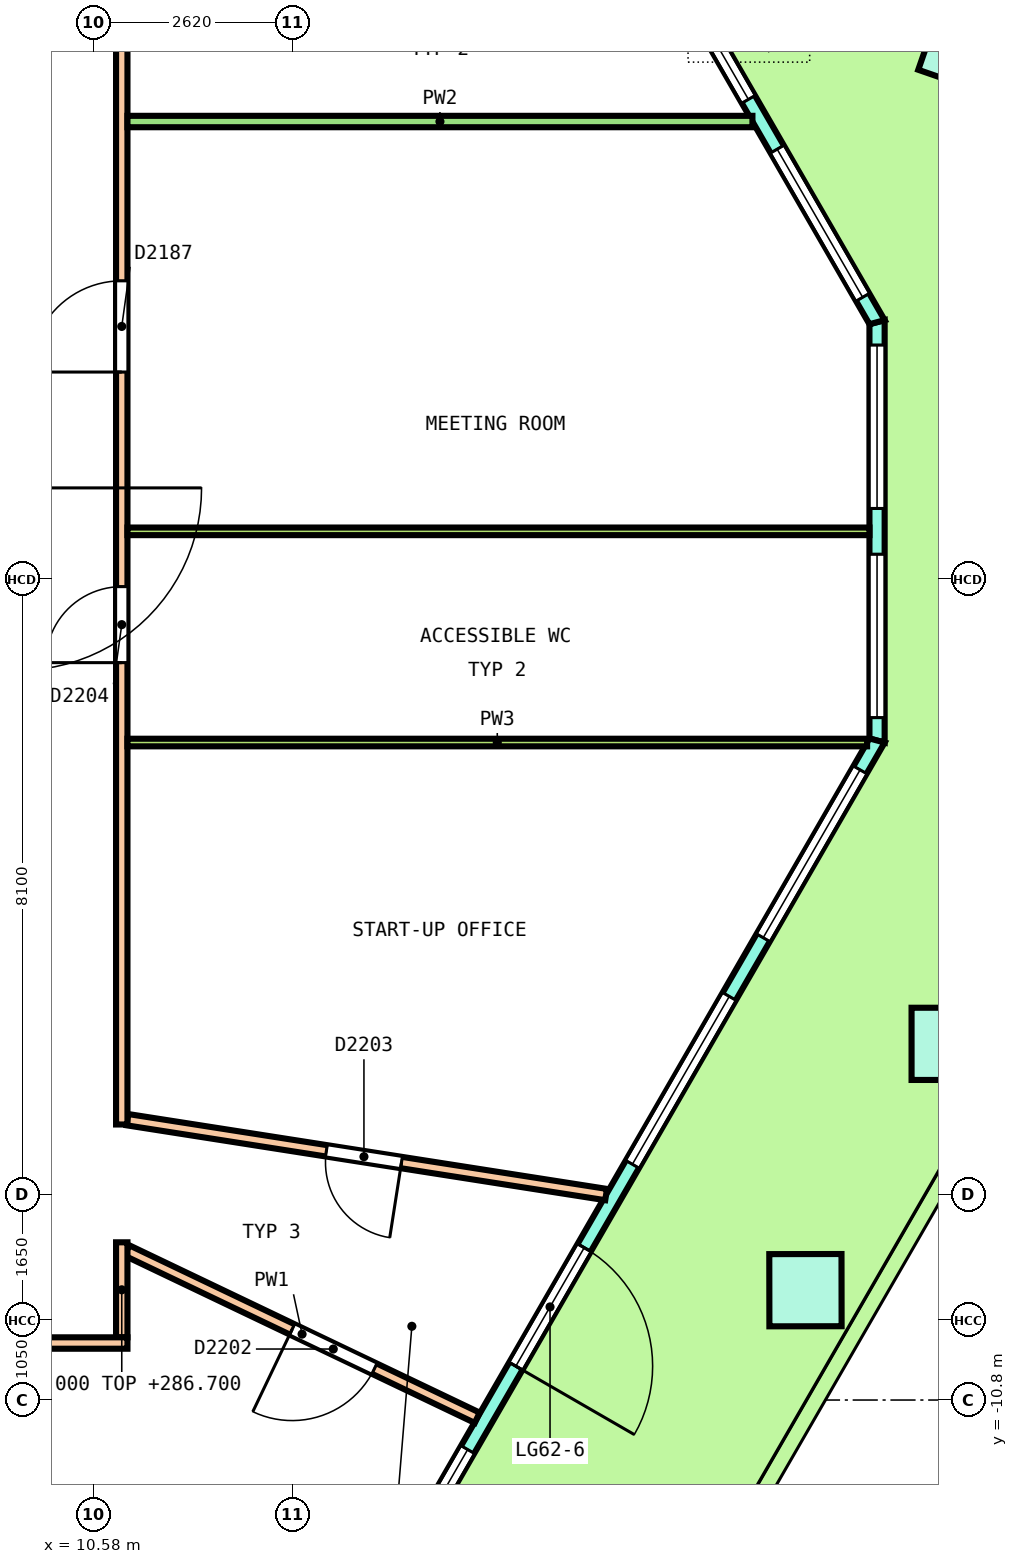
"""IFC4 building model, lengths in metres.
Left out: names, types, materials, properties, quantities, classifications, styles, units other than length and angle.
Written with IfcOpenShell. Run it as: python <this file> out.ifc"""

import sys

from ifc_helpers import new_model, si_unit, direction, frame, frame_2d, origin, origin_2d, place, context, subcontext, project, spatial, polyline, rectangle, outline, extrude, element, fill, save


model = new_model("IFC4")
c1 = context("Model", 3, precision=1e-05, world=origin(), true_north=direction((0.0, 1.0)))
c2 = subcontext(c1, "Body", "Model", "MODEL_VIEW")
j1 = project(units=[si_unit("LENGTHUNIT", "METRE"), si_unit("PLANEANGLEUNIT", "RADIAN")], contexts=[c1])
p1 = place(None, origin())
s1 = spatial("IfcSite", under=j1, at=p1, CompositionType="ELEMENT")
p2 = place(p1, origin())
s2 = spatial("IfcBuilding", under=s1, at=p2, CompositionType="ELEMENT")
p3 = place(p2, frame((0.0, 0.0, 283.0)))
s3 = spatial("IfcBuildingStorey", under=s2, at=p3, CompositionType="ELEMENT", Elevation=283.0)
p4 = place(p3, frame((22.033, 6.994, 0.0), z_axis=(0.021727128018, 0.025136615799, 0.999447888814), x_axis=(-0.500981292203, 0.865389796007, -0.010874089855)))
e1 = element("IfcColumn", 1, at=p4, inside=s3, PredefinedType="COLUMN", context=c2, shape_type="SweptSolid", body=[
    extrude(rectangle(XDim=0.95, YDim=0.95, at=origin_2d()), origin(), (0.0, 0.0, 1.0), 3.652),
])
p5 = place(p3, frame((19.945, -9.355, 0.0), z_axis=(0.003678832152, 0.006287458586, 0.999973466677), x_axis=(0.503695370374, 0.863850628317, -0.007284629059)))
e2 = element("IfcColumn", 2, at=p5, inside=s3, PredefinedType="COLUMN", context=c2, shape_type="SweptSolid", body=[
    extrude(rectangle(XDim=0.95, YDim=0.95, at=origin_2d()), origin(), (0.0, 0.0, 1.0), 3.65),
])
p6 = place(p3, frame((21.816, -6.114, 0.0), z_axis=(0.010900423214, 0.018858400897, 0.999762742599), x_axis=(0.500226175498, 0.86562076849, -0.02178206845)))
e3 = element("IfcColumn", 3, at=p6, inside=s3, PredefinedType="COLUMN", context=c2, shape_type="SweptSolid", body=[
    extrude(rectangle(XDim=0.95, YDim=0.95, at=origin_2d()), origin(), (0.0, 0.0, 1.0), 3.651),
])
p7 = place(p3, frame((20.887, -2.123, 0.0), z_axis=(0.0, 0.0, 1.0), x_axis=(0.0, 1.0, 0.0)))
e4 = element("IfcWall", 4, at=p7, inside=s3, PredefinedType="SOLIDWALL", context=c2, shape_type="SweptSolid", body=[
    extrude(outline(polyline([(-0.027, -0.1), (1.084, -0.1), (2.196, -0.1), (3.307, -0.1), (4.419, -0.1), (5.53, -0.1), (5.477, 0.1), (4.387, 0.1), (3.297, 0.1), (2.207, 0.1), (1.117, 0.1), (0.027, 0.1), (-0.027, -0.1)])), origin(), (0.0, 0.0, 1.0), 3.7),
])
p8 = place(p7, frame((0.301, 0.0, 0.1)))
e5 = element("IfcOpeningElement", 5, at=p8, cuts=e4, PredefinedType="OPENING", context=c2, shape_type="SweptSolid", body=[
    extrude(rectangle(XDim=2.15, YDim=2.75, at=frame_2d((1.075, 1.375))), frame((0.0, 0.11, 0.0), z_axis=(0.0, -1.0, 0.0), x_axis=(1.0, 0.0, 0.0)), (0.0, 0.0, 1.0), 0.22),
])
p9 = place(p7, frame((3.052, 0.0, 0.1)))
e6 = element("IfcOpeningElement", 6, at=p9, cuts=e4, PredefinedType="OPENING", context=c2, shape_type="SweptSolid", body=[
    extrude(rectangle(XDim=2.15, YDim=2.75, at=frame_2d((1.075, 1.375))), frame((0.0, 0.11, 0.0), z_axis=(0.0, -1.0, 0.0), x_axis=(1.0, 0.0, 0.0)), (0.0, 0.0, 1.0), 0.22),
])
p10 = place(p3, frame((20.887, 3.38, 0.0), z_axis=(0.0, 0.0, 1.0), x_axis=(-0.50000644309, 0.866021683832, 0.0)))
e7 = element("IfcWall", 7, at=p10, inside=s3, PredefinedType="SOLIDWALL", context=c2, shape_type="SweptSolid", body=[
    extrude(outline(polyline([(-0.027, -0.1), (0.979, -0.1), (1.985, -0.1), (2.99, -0.1), (3.996, -0.1), (5.002, -0.1), (6.007, -0.1), (7.013, -0.1), (8.019, -0.1), (9.025, -0.1), (10.03, -0.1), (11.036, -0.1), (12.042, -0.1), (13.047, -0.1), (14.053, -0.1), (15.059, -0.1), (15.005, 0.1), (14.007, 0.1), (13.008, 0.1), (12.01, 0.1), (11.011, 0.1), (10.012, 0.1), (9.014, 0.1), (8.015, 0.1), (7.017, 0.1), (6.018, 0.1), (5.02, 0.1), (4.021, 0.1), (3.022, 0.1), (2.024, 0.1), (1.025, 0.1), (0.027, 0.1), (-0.027, -0.1)])), origin(), (0.0, 0.0, 1.0), 3.7),
])
p11 = place(p10, frame((0.378, 0.0, 0.1)))
e8 = element("IfcOpeningElement", 8, at=p11, cuts=e7, PredefinedType="OPENING", context=c2, shape_type="SweptSolid", body=[
    extrude(rectangle(XDim=2.25, YDim=2.75, at=frame_2d((1.125, 1.375))), frame((0.0, 0.11, 0.0), z_axis=(0.0, -1.0, 0.0), x_axis=(1.0, 0.0, 0.0)), (0.0, 0.0, 1.0), 0.22),
])
p12 = place(p10, frame((3.385, 0.0, 0.1)))
e9 = element("IfcOpeningElement", 9, at=p12, cuts=e7, PredefinedType="OPENING", context=c2, shape_type="SweptSolid", body=[
    extrude(rectangle(XDim=2.25, YDim=2.75, at=frame_2d((1.125, 1.375))), frame((0.0, 0.11, 0.0), z_axis=(0.0, -1.0, 0.0), x_axis=(1.0, 0.0, 0.0)), (0.0, 0.0, 1.0), 0.22),
])
p13 = place(p10, frame((6.616, 0.0, 0.0)))
e10 = element("IfcOpeningElement", 10, at=p13, cuts=e7, PredefinedType="OPENING", context=c2, shape_type="SweptSolid", body=[
    extrude(rectangle(XDim=1.8, YDim=2.4, at=frame_2d((0.9, 1.2))), frame((0.0, 0.11, 0.0), z_axis=(0.0, -1.0, 0.0), x_axis=(1.0, 0.0, 0.0)), (0.0, 0.0, 1.0), 0.22),
])
p14 = place(p10, frame((6.616, 0.0, 2.55)))
e11 = element("IfcOpeningElement", 11, at=p14, cuts=e7, PredefinedType="OPENING", context=c2, shape_type="SweptSolid", body=[
    extrude(rectangle(XDim=1.8, YDim=0.3, at=frame_2d((0.9, 0.15))), frame((0.0, 0.11, 0.0), z_axis=(0.0, -1.0, 0.0), x_axis=(1.0, 0.0, 0.0)), (0.0, 0.0, 1.0), 0.22),
])
p15 = place(p10, frame((9.397, 0.0, 0.1)))
e12 = element("IfcOpeningElement", 12, at=p15, cuts=e7, PredefinedType="OPENING", context=c2, shape_type="SweptSolid", body=[
    extrude(rectangle(XDim=2.25, YDim=2.75, at=frame_2d((1.125, 1.375))), frame((0.0, 0.11, 0.0), z_axis=(0.0, -1.0, 0.0), x_axis=(1.0, 0.0, 0.0)), (0.0, 0.0, 1.0), 0.22),
])
p16 = place(p10, frame((12.404, 0.0, 0.1)))
e13 = element("IfcOpeningElement", 13, at=p16, cuts=e7, PredefinedType="OPENING", context=c2, shape_type="SweptSolid", body=[
    extrude(rectangle(XDim=2.25, YDim=2.75, at=frame_2d((1.125, 1.375))), frame((0.0, 0.11, 0.0), z_axis=(0.0, -1.0, 0.0), x_axis=(1.0, 0.0, 0.0)), (0.0, 0.0, 1.0), 0.22),
])
p17 = place(p3, frame((12.282, -17.027, 0.0), z_axis=(0.0, 0.0, 1.0), x_axis=(0.500006945931, 0.866021393512, 0.0)))
e14 = element("IfcWall", 14, at=p17, inside=s3, PredefinedType="SOLIDWALL", context=c2, shape_type="SweptSolid", body=[
    extrude(outline(polyline([(-0.027, -0.1), (0.989, -0.1), (2.004, -0.1), (3.02, -0.1), (4.035, -0.1), (5.051, -0.1), (6.066, -0.1), (7.081, -0.1), (8.097, -0.1), (9.112, -0.1), (10.128, -0.1), (11.143, -0.1), (12.159, -0.1), (13.174, -0.1), (14.19, -0.1), (15.205, -0.1), (16.221, -0.1), (17.236, -0.1), (17.182, 0.1), (16.173, 0.1), (15.164, 0.1), (14.155, 0.1), (13.146, 0.1), (12.137, 0.1), (11.127, 0.1), (10.118, 0.1), (9.109, 0.1), (8.1, 0.1), (7.091, 0.1), (6.082, 0.1), (5.073, 0.1), (4.063, 0.1), (3.054, 0.1), (2.045, 0.1), (1.036, 0.1), (0.027, 0.1), (-0.027, -0.1)])), origin(), (0.0, 0.0, 1.0), 3.7),
])
p18 = place(p17, frame((0.446, 0.0, 0.1)))
e15 = element("IfcOpeningElement", 15, at=p18, cuts=e14, PredefinedType="OPENING", context=c2, shape_type="SweptSolid", body=[
    extrude(rectangle(XDim=2.55, YDim=2.75, at=frame_2d((1.275, 1.375))), frame((0.0, 0.11, 0.0), z_axis=(0.0, -1.0, 0.0), x_axis=(1.0, 0.0, 0.0)), (0.0, 0.0, 1.0), 0.22),
])
p19 = place(p17, frame((3.888, 0.0, 0.1)))
e16 = element("IfcOpeningElement", 16, at=p19, cuts=e14, PredefinedType="OPENING", context=c2, shape_type="SweptSolid", body=[
    extrude(rectangle(XDim=2.55, YDim=2.75, at=frame_2d((1.275, 1.375))), frame((0.0, 0.11, 0.0), z_axis=(0.0, -1.0, 0.0), x_axis=(1.0, 0.0, 0.0)), (0.0, 0.0, 1.0), 0.22),
])
p20 = place(p17, frame((7.705, 0.0, 0.0)))
e17 = element("IfcOpeningElement", 17, at=p20, cuts=e14, PredefinedType="OPENING", context=c2, shape_type="SweptSolid", body=[
    extrude(rectangle(XDim=1.8, YDim=2.4, at=frame_2d((0.9, 1.2))), frame((0.0, 0.11, 0.0), z_axis=(0.0, -1.0, 0.0), x_axis=(1.0, 0.0, 0.0)), (0.0, 0.0, 1.0), 0.22),
])
p21 = place(p17, frame((7.705, 0.0, 2.55)))
e18 = element("IfcOpeningElement", 18, at=p21, cuts=e14, PredefinedType="OPENING", context=c2, shape_type="SweptSolid", body=[
    extrude(rectangle(XDim=1.8, YDim=0.3, at=frame_2d((0.9, 0.15))), frame((0.0, 0.11, 0.0), z_axis=(0.0, -1.0, 0.0), x_axis=(1.0, 0.0, 0.0)), (0.0, 0.0, 1.0), 0.22),
])
p22 = place(p17, frame((10.771, 0.0, 0.1)))
e19 = element("IfcOpeningElement", 19, at=p22, cuts=e14, PredefinedType="OPENING", context=c2, shape_type="SweptSolid", body=[
    extrude(rectangle(XDim=2.55, YDim=2.75, at=frame_2d((1.275, 1.375))), frame((0.0, 0.11, 0.0), z_axis=(0.0, -1.0, 0.0), x_axis=(1.0, 0.0, 0.0)), (0.0, 0.0, 1.0), 0.22),
])
p23 = place(p17, frame((14.213, 0.0, 0.1)))
e20 = element("IfcOpeningElement", 20, at=p23, cuts=e14, PredefinedType="OPENING", context=c2, shape_type="SweptSolid", body=[
    extrude(rectangle(XDim=2.55, YDim=2.75, at=frame_2d((1.275, 1.375))), frame((0.0, 0.11, 0.0), z_axis=(0.0, -1.0, 0.0), x_axis=(1.0, 0.0, 0.0)), (0.0, 0.0, 1.0), 0.22),
])
p24 = place(p3, frame((11.018, -8.832, 0.0), z_axis=(0.0, 0.0, 1.0), x_axis=(0.902358965465, -0.430985263605, 0.0)))
e21 = element("IfcWall", 21, at=p24, inside=s3, PredefinedType="PARTITIONING", context=c2, shape_type="SweptSolid", body=[
    extrude(rectangle(XDim=5.108, YDim=0.15, at=frame_2d((2.554, 0.0))), origin(), (0.0, 0.0, 1.0), 2.9),
])
p25 = place(p24, frame((2.409, 0.0, 0.0)))
e22 = element("IfcOpeningElement", 22, at=p25, cuts=e21, PredefinedType="OPENING", context=c2, shape_type="SweptSolid", body=[
    extrude(rectangle(XDim=1.2, YDim=2.1, at=frame_2d((0.6, 1.05))), frame((0.0, 0.085, 0.0), z_axis=(0.0, -1.0, 0.0), x_axis=(1.0, 0.0, 0.0)), (0.0, 0.0, 1.0), 0.17),
])
p26 = place(p3, frame((11.024, -7.112, 0.0), z_axis=(0.0, 0.0, 1.0), x_axis=(0.987981529177, -0.154571983245, 0.0)))
e23 = element("IfcWall", 23, at=p26, inside=s3, PredefinedType="PARTITIONING", context=c2, shape_type="SweptSolid", body=[
    extrude(rectangle(XDim=6.375, YDim=0.15, at=frame_2d((3.188, 0.0))), origin(), (0.0, 0.0, 1.0), 2.9),
])
p27 = place(p26, frame((2.65, 0.0, 0.0)))
e24 = element("IfcOpeningElement", 24, at=p27, cuts=e23, PredefinedType="OPENING", context=c2, shape_type="SweptSolid", body=[
    extrude(rectangle(XDim=1.0, YDim=2.1, at=frame_2d((0.5, 1.05))), frame((0.0, 0.085, 0.0), z_axis=(0.0, -1.0, 0.0), x_axis=(1.0, 0.0, 0.0)), (0.0, 0.0, 1.0), 0.17),
])
p28 = place(p3, frame((10.95, -9.975, 0.0), z_axis=(0.0, 0.0, 1.0), x_axis=(0.0, 1.0, 0.0)))
e25 = element("IfcWall", 25, at=p28, inside=s3, PredefinedType="PARTITIONING", context=c2, shape_type="SweptSolid", body=[
    extrude(rectangle(XDim=1.25, YDim=0.15, at=frame_2d((0.625, 0.0))), origin(), (0.0, 0.0, 1.0), 3.7),
])
p29 = place(p3, frame((10.95, -7.175, 0.0), z_axis=(0.0, 0.0, 1.0), x_axis=(0.0, 1.0, 0.0)))
e26 = element("IfcWall", 26, at=p29, inside=s3, PredefinedType="PARTITIONING", context=c2, shape_type="SweptSolid", body=[
    extrude(rectangle(XDim=17.15, YDim=0.15, at=frame_2d((8.575, 0.0))), origin(), (0.0, 0.0, 1.0), 2.9),
])
p30 = place(p29, frame((9.899, 0.0, 0.0)))
e27 = element("IfcOpeningElement", 27, at=p30, cuts=e26, PredefinedType="OPENING", context=c2, shape_type="SweptSolid", body=[
    extrude(rectangle(XDim=1.2, YDim=2.1, at=frame_2d((0.6, 1.05))), frame((0.0, 0.085, 0.0), z_axis=(0.0, -1.0, 0.0), x_axis=(1.0, 0.0, 0.0)), (0.0, 0.0, 1.0), 0.17),
])
p31 = place(p29, frame((14.71, 0.0, 0.0)))
e28 = element("IfcOpeningElement", 28, at=p31, cuts=e26, PredefinedType="OPENING", context=c2, shape_type="SweptSolid", body=[
    extrude(rectangle(XDim=1.0, YDim=2.1, at=frame_2d((0.5, 1.05))), frame((0.0, 0.085, 0.0), z_axis=(0.0, -1.0, 0.0), x_axis=(1.0, 0.0, 0.0)), (0.0, 0.0, 1.0), 0.17),
])
p32 = place(p29, frame((6.076, 0.0, 0.0)))
e29 = element("IfcOpeningElement", 29, at=p32, cuts=e26, PredefinedType="OPENING", context=c2, shape_type="SweptSolid", body=[
    extrude(rectangle(XDim=1.0, YDim=2.1, at=frame_2d((0.5, 1.05))), frame((0.0, 0.085, 0.0), z_axis=(0.0, -1.0, 0.0), x_axis=(1.0, 0.0, 0.0)), (0.0, 0.0, 1.0), 0.17),
])
p33 = place(p3, frame((-10.9, -10.05, 0.0), z_axis=(0.0, 0.0, 1.0), x_axis=(1.0, 0.0, 0.0)))
e30 = element("IfcWall", 30, at=p33, inside=s3, PredefinedType="PARTITIONING", context=c2, shape_type="SweptSolid", body=[
    extrude(rectangle(XDim=21.925, YDim=0.15, at=frame_2d((10.962, 0.0))), origin(), (0.0, 0.0, 1.0), 2.9),
])
p34 = place(p33, frame((2.562, 0.0, 0.0)))
e31 = element("IfcOpeningElement", 31, at=p34, cuts=e30, PredefinedType="OPENING", context=c2, shape_type="SweptSolid", body=[
    extrude(rectangle(XDim=1.2, YDim=2.1, at=frame_2d((0.6, 1.05))), frame((0.0, 0.085, 0.0), z_axis=(0.0, -1.0, 0.0), x_axis=(1.0, 0.0, 0.0)), (0.0, 0.0, 1.0), 0.17),
])
p35 = place(p33, frame((9.227, 0.0, 0.0)))
e32 = element("IfcOpeningElement", 32, at=p35, cuts=e30, PredefinedType="OPENING", context=c2, shape_type="SweptSolid", body=[
    extrude(rectangle(XDim=1.2, YDim=2.1, at=frame_2d((0.6, 1.05))), frame((0.0, 0.085, 0.0), z_axis=(0.0, -1.0, 0.0), x_axis=(1.0, 0.0, 0.0)), (0.0, 0.0, 1.0), 0.17),
])
p36 = place(p33, frame((16.632, 0.0, 0.0)))
e33 = element("IfcOpeningElement", 33, at=p36, cuts=e30, PredefinedType="OPENING", context=c2, shape_type="SweptSolid", body=[
    extrude(rectangle(XDim=1.0, YDim=2.1, at=frame_2d((0.5, 1.05))), frame((0.0, 0.085, 0.0), z_axis=(0.0, -1.0, 0.0), x_axis=(1.0, 0.0, 0.0)), (0.0, 0.0, 1.0), 0.17),
])
p37 = place(p3, frame((11.025, 6.02, 0.0), z_axis=(0.0, 0.0, 1.0), x_axis=(1.0, 0.0, 0.0)))
e34 = element("IfcWall", 34, at=p37, inside=s3, PredefinedType="PARTITIONING", context=c2, shape_type="SweptSolid", body=[
    extrude(rectangle(XDim=8.222, YDim=0.15, at=frame_2d((4.111, 0.0))), origin(), (0.0, 0.0, 1.0), 2.9),
])
p38 = place(p3, frame((11.025, 0.628, 0.0), z_axis=(0.0, 0.0, 1.0), x_axis=(1.0, 0.0, 0.0)))
e35 = element("IfcWall", 35, at=p38, inside=s3, PredefinedType="PARTITIONING", context=c2, shape_type="SweptSolid", body=[
    extrude(rectangle(XDim=9.762, YDim=0.1, at=frame_2d((4.881, 0.0))), origin(), (0.0, 0.0, 1.0), 2.9),
])
p39 = place(p3, frame((11.025, -2.15, 0.0), z_axis=(0.0, 0.0, 1.0), x_axis=(1.0, 0.0, 0.0)))
e36 = element("IfcWall", 36, at=p39, inside=s3, PredefinedType="PARTITIONING", context=c2, shape_type="SweptSolid", body=[
    extrude(rectangle(XDim=9.731, YDim=0.1, at=frame_2d((4.865, 0.0))), origin(), (0.0, 0.0, 1.0), 2.9),
])
p40 = place(p8, origin())
e37 = element("IfcWindow", 37, at=p40, inside=s3, PartitioningType="SINGLE_PANEL", PredefinedType="WINDOW", context=c2, shape_type="SweptSolid", body=[
    extrude(rectangle(XDim=2.15, YDim=2.75, at=frame_2d((1.075, 1.375))), frame((0.0, 0.03, 0.0), z_axis=(0.0, -1.0, 0.0), x_axis=(1.0, 0.0, 0.0)), (0.0, 0.0, 1.0), 0.06),
])
fill(e5, e37)
p41 = place(p9, origin())
e38 = element("IfcWindow", 38, at=p41, inside=s3, PartitioningType="SINGLE_PANEL", PredefinedType="WINDOW", context=c2, shape_type="SweptSolid", body=[
    extrude(rectangle(XDim=2.15, YDim=2.75, at=frame_2d((1.075, 1.375))), frame((0.0, 0.03, 0.0), z_axis=(0.0, -1.0, 0.0), x_axis=(1.0, 0.0, 0.0)), (0.0, 0.0, 1.0), 0.06),
])
fill(e6, e38)
p42 = place(p11, origin())
e39 = element("IfcWindow", 39, at=p42, inside=s3, PartitioningType="SINGLE_PANEL", PredefinedType="WINDOW", context=c2, shape_type="SweptSolid", body=[
    extrude(rectangle(XDim=2.25, YDim=2.75, at=frame_2d((1.125, 1.375))), frame((0.0, 0.03, 0.0), z_axis=(0.0, -1.0, 0.0), x_axis=(1.0, 0.0, 0.0)), (0.0, 0.0, 1.0), 0.06),
])
fill(e8, e39)
p43 = place(p12, origin())
e40 = element("IfcWindow", 40, at=p43, inside=s3, PartitioningType="SINGLE_PANEL", PredefinedType="WINDOW", context=c2, shape_type="SweptSolid", body=[
    extrude(rectangle(XDim=2.25, YDim=2.75, at=frame_2d((1.125, 1.375))), frame((0.0, 0.03, 0.0), z_axis=(0.0, -1.0, 0.0), x_axis=(1.0, 0.0, 0.0)), (0.0, 0.0, 1.0), 0.06),
])
fill(e9, e40)
p44 = place(p19, origin())
e41 = element("IfcWindow", 41, at=p44, inside=s3, PartitioningType="SINGLE_PANEL", PredefinedType="WINDOW", context=c2, shape_type="SweptSolid", body=[
    extrude(rectangle(XDim=2.55, YDim=2.75, at=frame_2d((1.275, 1.375))), frame((0.0, 0.03, 0.0), z_axis=(0.0, -1.0, 0.0), x_axis=(1.0, 0.0, 0.0)), (0.0, 0.0, 1.0), 0.06),
])
fill(e16, e41)
p45 = place(p20, origin())
e42 = element("IfcDoor", 42, at=p45, inside=s3, OperationType="DOUBLE_DOOR_SINGLE_SWING", PredefinedType="DOOR", context=c2, shape_type="SweptSolid", body=[
    extrude(rectangle(XDim=1.8, YDim=2.4, at=frame_2d((0.9, 1.2))), frame((0.0, 0.025, 0.0), z_axis=(0.0, -1.0, 0.0), x_axis=(1.0, 0.0, 0.0)), (0.0, 0.0, 1.0), 0.05),
])
fill(e17, e42)
p46 = place(p21, origin())
e43 = element("IfcWindow", 43, at=p46, inside=s3, PartitioningType="SINGLE_PANEL", PredefinedType="WINDOW", context=c2, shape_type="SweptSolid", body=[
    extrude(rectangle(XDim=1.8, YDim=0.3, at=frame_2d((0.9, 0.15))), frame((0.0, 0.03, 0.0), z_axis=(0.0, -1.0, 0.0), x_axis=(1.0, 0.0, 0.0)), (0.0, 0.0, 1.0), 0.06),
])
fill(e18, e43)
p47 = place(p22, origin())
e44 = element("IfcWindow", 44, at=p47, inside=s3, PartitioningType="SINGLE_PANEL", PredefinedType="WINDOW", context=c2, shape_type="SweptSolid", body=[
    extrude(rectangle(XDim=2.55, YDim=2.75, at=frame_2d((1.275, 1.375))), frame((0.0, 0.03, 0.0), z_axis=(0.0, -1.0, 0.0), x_axis=(1.0, 0.0, 0.0)), (0.0, 0.0, 1.0), 0.06),
])
fill(e19, e44)
p48 = place(p23, origin())
e45 = element("IfcWindow", 45, at=p48, inside=s3, PartitioningType="SINGLE_PANEL", PredefinedType="WINDOW", context=c2, shape_type="SweptSolid", body=[
    extrude(rectangle(XDim=2.55, YDim=2.75, at=frame_2d((1.275, 1.375))), frame((0.0, 0.03, 0.0), z_axis=(0.0, -1.0, 0.0), x_axis=(1.0, 0.0, 0.0)), (0.0, 0.0, 1.0), 0.06),
])
fill(e20, e45)
p49 = place(p30, origin())
e46 = element("IfcDoor", 46, at=p49, inside=s3, OperationType="DOUBLE_DOOR_SINGLE_SWING", PredefinedType="DOOR", context=c2, shape_type="SweptSolid", body=[
    extrude(rectangle(XDim=1.2, YDim=2.1, at=frame_2d((0.6, 1.05))), frame((0.0, 0.025, 0.0), z_axis=(0.0, -1.0, 0.0), x_axis=(1.0, 0.0, 0.0)), (0.0, 0.0, 1.0), 0.05),
])
fill(e27, e46)
p50 = place(p25, origin())
e47 = element("IfcDoor", 47, at=p50, inside=s3, OperationType="DOUBLE_DOOR_SINGLE_SWING", PredefinedType="DOOR", context=c2, shape_type="SweptSolid", body=[
    extrude(rectangle(XDim=1.2, YDim=2.1, at=frame_2d((0.6, 1.05))), frame((0.0, 0.025, 0.0), z_axis=(0.0, -1.0, 0.0), x_axis=(1.0, 0.0, 0.0)), (0.0, 0.0, 1.0), 0.05),
])
fill(e22, e47)
p51 = place(p27, origin())
e48 = element("IfcDoor", 48, at=p51, inside=s3, OperationType="SINGLE_SWING_LEFT", PredefinedType="DOOR", context=c2, shape_type="SweptSolid", body=[
    extrude(rectangle(XDim=1.0, YDim=2.1, at=frame_2d((0.5, 1.05))), frame((0.0, 0.025, 0.0), z_axis=(0.0, -1.0, 0.0), x_axis=(1.0, 0.0, 0.0)), (0.0, 0.0, 1.0), 0.05),
])
fill(e24, e48)
p52 = place(p32, origin())
e49 = element("IfcDoor", 49, at=p52, inside=s3, OperationType="SINGLE_SWING_RIGHT", PredefinedType="DOOR", context=c2, shape_type="SweptSolid", body=[
    extrude(rectangle(XDim=1.0, YDim=2.1, at=frame_2d((0.5, 1.05))), frame((0.0, 0.025, 0.0), z_axis=(0.0, -1.0, 0.0), x_axis=(1.0, 0.0, 0.0)), (0.0, 0.0, 1.0), 0.05),
])
fill(e29, e49)
save(model, sys.argv[1])
